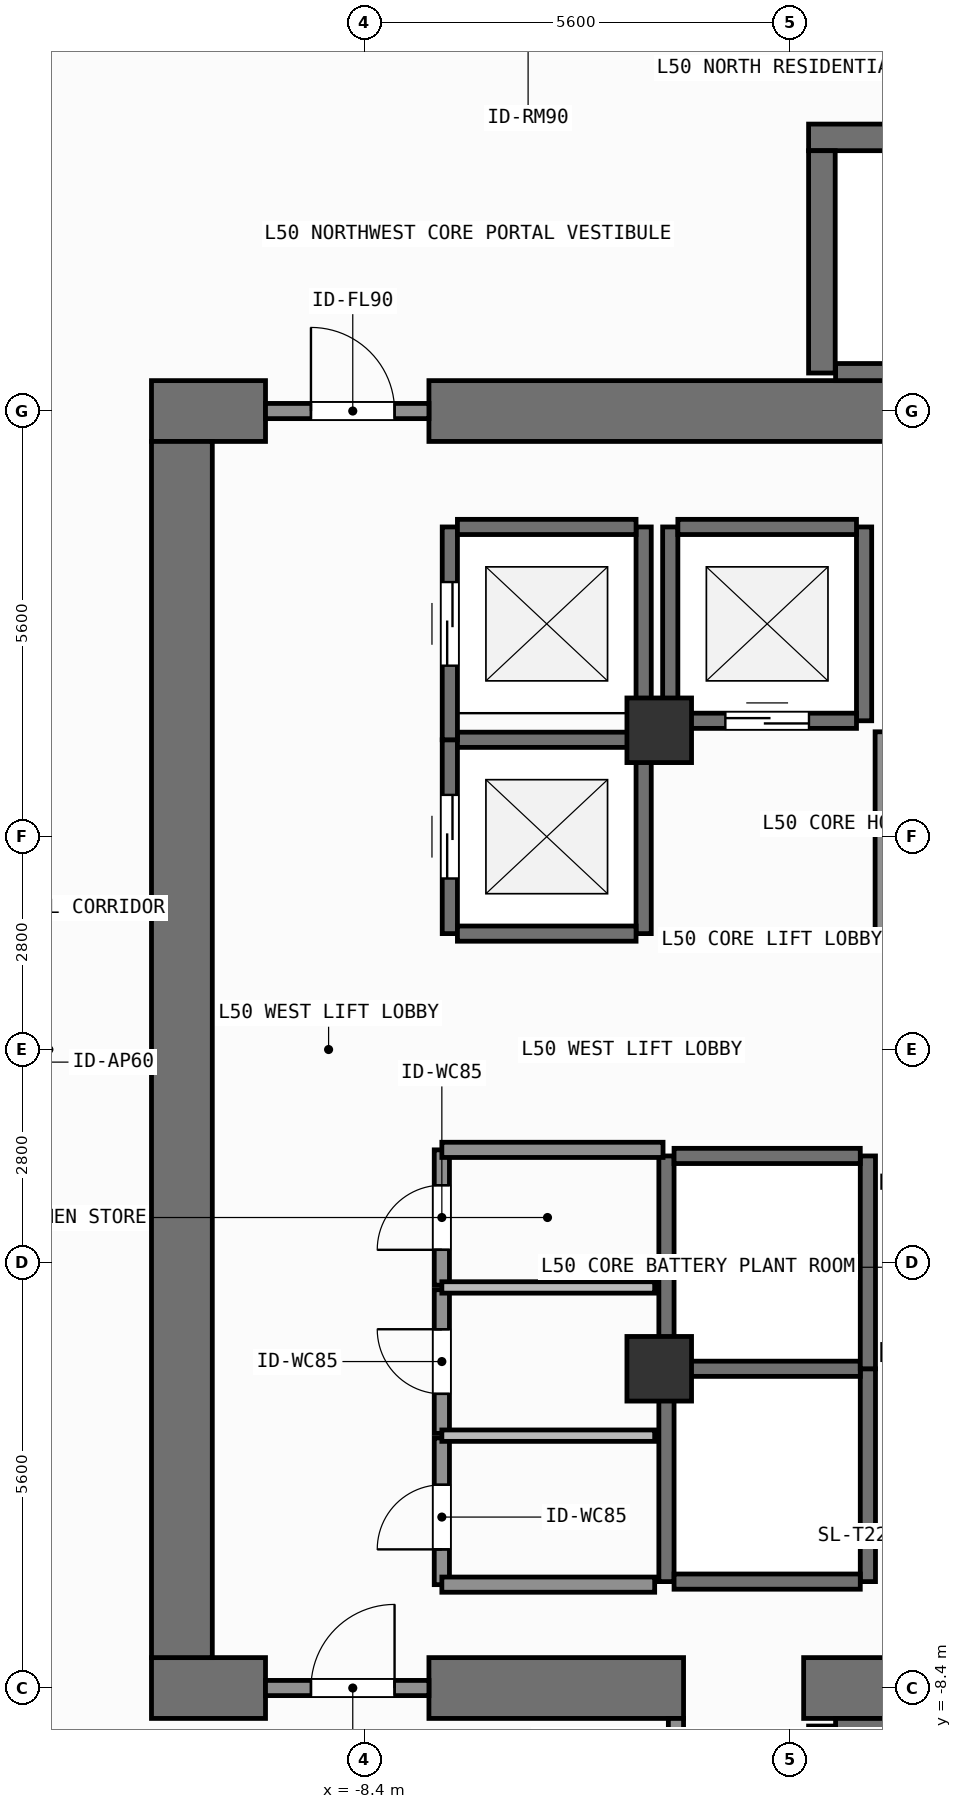
"""IFC4 building model, lengths in metres.
Left out: names, types, materials, properties, quantities, classifications, styles, units other than length and angle.
Written with IfcOpenShell. Run it as: python <this file> out.ifc"""

import sys

from ifc_helpers import new_model, si_unit, direction, frame, frame_2d, origin, origin_2d, place, context, subcontext, project, spatial, rectangle, extrude, element, fill, save


model = new_model("IFC4")
c1 = context("Model", 3, precision=1e-05, world=origin(), true_north=direction((0.0, 1.0)))
c2 = subcontext(c1, "Body", "Model", "MODEL_VIEW")
j1 = project(units=[si_unit("LENGTHUNIT", "METRE"), si_unit("PLANEANGLEUNIT", "RADIAN")], contexts=[c1])
p1 = place(None, origin())
s1 = spatial("IfcSite", under=j1, at=p1, CompositionType="ELEMENT")
p2 = place(p1, origin())
s2 = spatial("IfcBuilding", under=s1, at=p2, CompositionType="ELEMENT")
p3 = place(p2, frame((0.0, 0.0, 203.1)))
s3 = spatial("IfcBuildingStorey", under=s2, at=p3, CompositionType="ELEMENT", Elevation=203.1)
p4 = place(p3, frame((-11.2, -8.4, 0.0), z_axis=(0.0, 0.0, 1.0), x_axis=(1.0, 0.0, 0.0)))
e1 = element("IfcWall", 1, at=p4, inside=s3, PredefinedType="SHEAR", context=c2, shape_type="SweptSolid", body=[
    extrude(rectangle(XDim=1.5, YDim=0.8, at=frame_2d((0.75, 0.0))), origin(), (0.0, 0.0, 1.0), 3.9),
])
p5 = place(p3, frame((-7.55, -8.4, 0.0), z_axis=(0.0, 0.0, 1.0), x_axis=(1.0, 0.0, 0.0)))
e2 = element("IfcWall", 2, at=p5, inside=s3, PredefinedType="SHEAR", context=c2, shape_type="SweptSolid", body=[
    extrude(rectangle(XDim=3.35, YDim=0.8, at=frame_2d((1.675, 0.0))), origin(), (0.0, 0.0, 1.0), 3.9),
])
p6 = place(p3, frame((-2.62, -8.4, 0.0), z_axis=(0.0, 0.0, 1.0), x_axis=(1.0, 0.0, 0.0)))
e3 = element("IfcWall", 3, at=p6, inside=s3, PredefinedType="SHEAR", context=c2, shape_type="SweptSolid", body=[
    extrude(rectangle(XDim=7.27, YDim=0.8, at=frame_2d((3.635, 0.0))), origin(), (0.0, 0.0, 1.0), 3.9),
])
p7 = place(p3, frame((-11.2, 8.4, 0.0), z_axis=(0.0, 0.0, 1.0), x_axis=(1.0, 0.0, 0.0)))
e4 = element("IfcWall", 4, at=p7, inside=s3, PredefinedType="SHEAR", context=c2, shape_type="SweptSolid", body=[
    extrude(rectangle(XDim=1.5, YDim=0.8, at=frame_2d((0.75, 0.0))), origin(), (0.0, 0.0, 1.0), 3.9),
])
p8 = place(p3, frame((-7.55, 8.4, 0.0), z_axis=(0.0, 0.0, 1.0), x_axis=(1.0, 0.0, 0.0)))
e5 = element("IfcWall", 5, at=p8, inside=s3, PredefinedType="SHEAR", context=c2, shape_type="SweptSolid", body=[
    extrude(rectangle(XDim=16.35, YDim=0.8, at=frame_2d((8.175, 0.0))), origin(), (0.0, 0.0, 1.0), 3.9),
])
p9 = place(p3, frame((-10.8, -8.0, 0.0), z_axis=(0.0, 0.0, 1.0), x_axis=(0.0, 1.0, 0.0)))
e6 = element("IfcWall", 6, at=p9, inside=s3, PredefinedType="SHEAR", context=c2, shape_type="SweptSolid", body=[
    extrude(rectangle(XDim=16.0, YDim=0.8, at=frame_2d((8.0, 0.0))), origin(), (0.0, 0.0, 1.0), 3.9),
])
p10 = place(p3, frame((-2.2, -8.913, 0.0), z_axis=(0.0, 0.0, 1.0), x_axis=(1.0, 0.0, 0.0)))
e7 = element("IfcWall", 7, at=p10, inside=s3, PredefinedType="SHEAR", context=c2, shape_type="SweptSolid", body=[
    extrude(rectangle(XDim=6.6, YDim=0.225, at=frame_2d((3.3, 0.0))), origin(), (0.0, 0.0, 1.0), 3.9),
])
p11 = place(p3, frame((-2.38, -11.825, 0.0), z_axis=(0.0, 0.0, 1.0), x_axis=(0.0, 1.0, 0.0)))
e8 = element("IfcWall", 8, at=p11, inside=s3, PredefinedType="SHEAR", context=c2, shape_type="SweptSolid", body=[
    extrude(rectangle(XDim=2.925, YDim=0.35, at=frame_2d((1.462, 0.0))), origin(), (0.0, 0.0, 1.0), 3.9),
])
p12 = place(p3, frame((-2.555, 12.0, 0.0), z_axis=(0.0, 0.0, 1.0), x_axis=(1.0, 0.0, 0.0)))
e9 = element("IfcWall", 9, at=p12, inside=s3, PredefinedType="SHEAR", context=c2, shape_type="SweptSolid", body=[
    extrude(rectangle(XDim=7.31, YDim=0.35, at=frame_2d((3.655, 0.0))), origin(), (0.0, 0.0, 1.0), 3.9),
])
p13 = place(p3, frame((-2.2, 8.913, 0.0), z_axis=(0.0, 0.0, 1.0), x_axis=(1.0, 0.0, 0.0)))
e10 = element("IfcWall", 10, at=p13, inside=s3, PredefinedType="SHEAR", context=c2, shape_type="SweptSolid", body=[
    extrude(rectangle(XDim=6.6, YDim=0.225, at=frame_2d((3.3, 0.0))), origin(), (0.0, 0.0, 1.0), 3.9),
])
p14 = place(p3, frame((-2.38, 8.9, 0.0), z_axis=(0.0, 0.0, 1.0), x_axis=(0.0, 1.0, 0.0)))
e11 = element("IfcWall", 11, at=p14, inside=s3, PredefinedType="SHEAR", context=c2, shape_type="SweptSolid", body=[
    extrude(rectangle(XDim=2.925, YDim=0.35, at=frame_2d((1.462, 0.0))), origin(), (0.0, 0.0, 1.0), 3.9),
])
for number, where, z_axis, x_axis in (
    (12, (-4.52, -4.2, 0.0), (0.0, 0.0, 1.0), (1.0, 0.0, 0.0)),
    (13, (-4.52, 4.2, 0.0), (0.0, 0.0, 1.0), (1.0, 0.0, 0.0)),
):
    element("IfcColumn", number, at=place(p3, frame(where, z_axis=z_axis, x_axis=x_axis)), inside=s3, PredefinedType="COLUMN", context=c2, shape_type="SweptSolid", body=[
        extrude(rectangle(XDim=0.85, YDim=0.85, at=origin_2d()), origin(), (0.0, 0.0, 1.0), 3.9),
    ])
p15 = place(p3, frame((-7.275, 1.525, 0.0), z_axis=(0.0, 0.0, 1.0), x_axis=(0.0, 1.0, 0.0)))
e14 = element("IfcWall", 14, at=p15, inside=s3, PredefinedType="SHEAR", context=c2, shape_type="SweptSolid", body=[
    extrude(rectangle(XDim=2.55, YDim=0.2, at=frame_2d((1.275, 0.0))), origin(), (0.0, 0.0, 1.0), 3.68),
])
p16 = place(p15, frame((0.725, 0.0, 0.0)))
e15 = element("IfcOpeningElement", 15, at=p16, cuts=e14, PredefinedType="OPENING", context=c2, shape_type="SweptSolid", body=[
    extrude(rectangle(XDim=1.1, YDim=2.2, at=frame_2d((0.55, 1.1))), frame((0.0, 0.11, 0.0), z_axis=(0.0, -1.0, 0.0), x_axis=(1.0, 0.0, 0.0)), (0.0, 0.0, 1.0), 0.22),
])
p17 = place(p3, frame((-4.725, 1.525, 0.0), z_axis=(0.0, 0.0, 1.0), x_axis=(0.0, 1.0, 0.0)))
e16 = element("IfcWall", 16, at=p17, inside=s3, PredefinedType="SHEAR", context=c2, shape_type="SweptSolid", body=[
    extrude(rectangle(XDim=2.55, YDim=0.2, at=frame_2d((1.275, 0.0))), origin(), (0.0, 0.0, 1.0), 3.68),
])
for number, where, z_axis, x_axis in (
    (17, (-7.175, 1.525, 0.0), (0.0, 0.0, 1.0), (1.0, 0.0, 0.0)),
    (18, (-7.175, 4.075, 0.0), (0.0, 0.0, 1.0), (1.0, 0.0, 0.0)),
):
    element("IfcWall", number, at=place(p3, frame(where, z_axis=z_axis, x_axis=x_axis)), inside=s3, PredefinedType="SHEAR", context=c2, shape_type="SweptSolid", body=[
        extrude(rectangle(XDim=2.35, YDim=0.2, at=frame_2d((1.175, 0.0))), origin(), (0.0, 0.0, 1.0), 3.68),
    ])
p18 = place(p3, frame((-7.275, 4.075, 0.0), z_axis=(0.0, 0.0, 1.0), x_axis=(0.0, 1.0, 0.0)))
e19 = element("IfcWall", 19, at=p18, inside=s3, PredefinedType="SHEAR", context=c2, shape_type="SweptSolid", body=[
    extrude(rectangle(XDim=2.8, YDim=0.2, at=frame_2d((1.4, 0.0))), origin(), (0.0, 0.0, 1.0), 3.68),
])
p19 = place(p18, frame((0.975, 0.0, 0.0)))
e20 = element("IfcOpeningElement", 20, at=p19, cuts=e19, PredefinedType="OPENING", context=c2, shape_type="SweptSolid", body=[
    extrude(rectangle(XDim=1.1, YDim=2.2, at=frame_2d((0.55, 1.1))), frame((0.0, 0.11, 0.0), z_axis=(0.0, -1.0, 0.0), x_axis=(1.0, 0.0, 0.0)), (0.0, 0.0, 1.0), 0.22),
])
p20 = place(p3, frame((-4.725, 4.075, 0.0), z_axis=(0.0, 0.0, 1.0), x_axis=(0.0, 1.0, 0.0)))
e21 = element("IfcWall", 21, at=p20, inside=s3, PredefinedType="SHEAR", context=c2, shape_type="SweptSolid", body=[
    extrude(rectangle(XDim=2.8, YDim=0.2, at=frame_2d((1.4, 0.0))), origin(), (0.0, 0.0, 1.0), 3.68),
])
p21 = place(p3, frame((-7.175, 6.875, 0.0), z_axis=(0.0, 0.0, 1.0), x_axis=(1.0, 0.0, 0.0)))
e22 = element("IfcWall", 22, at=p21, inside=s3, PredefinedType="SHEAR", context=c2, shape_type="SweptSolid", body=[
    extrude(rectangle(XDim=2.35, YDim=0.2, at=frame_2d((1.175, 0.0))), origin(), (0.0, 0.0, 1.0), 3.68),
])
for number, where, z_axis, x_axis in (
    (23, (-4.375, 4.325, 0.0), (0.0, 0.0, 1.0), (0.0, 1.0, 0.0)),
    (24, (-1.825, 4.325, 0.0), (0.0, 0.0, 1.0), (0.0, 1.0, 0.0)),
):
    element("IfcWall", number, at=place(p3, frame(where, z_axis=z_axis, x_axis=x_axis)), inside=s3, PredefinedType="SHEAR", context=c2, shape_type="SweptSolid", body=[
        extrude(rectangle(XDim=2.55, YDim=0.2, at=frame_2d((1.275, 0.0))), origin(), (0.0, 0.0, 1.0), 3.68),
    ])
p22 = place(p3, frame((-4.275, 4.325, 0.0), z_axis=(0.0, 0.0, 1.0), x_axis=(1.0, 0.0, 0.0)))
e25 = element("IfcWall", 25, at=p22, inside=s3, PredefinedType="SHEAR", context=c2, shape_type="SweptSolid", body=[
    extrude(rectangle(XDim=2.35, YDim=0.2, at=frame_2d((1.175, 0.0))), origin(), (0.0, 0.0, 1.0), 3.68),
])
p23 = place(p22, frame((0.625, 0.0, 0.0)))
e26 = element("IfcOpeningElement", 26, at=p23, cuts=e25, PredefinedType="OPENING", context=c2, shape_type="SweptSolid", body=[
    extrude(rectangle(XDim=1.1, YDim=2.2, at=frame_2d((0.55, 1.1))), frame((0.0, 0.11, 0.0), z_axis=(0.0, -1.0, 0.0), x_axis=(1.0, 0.0, 0.0)), (0.0, 0.0, 1.0), 0.22),
])
p24 = place(p3, frame((-4.275, 6.875, 0.0), z_axis=(0.0, 0.0, 1.0), x_axis=(1.0, 0.0, 0.0)))
e27 = element("IfcWall", 27, at=p24, inside=s3, PredefinedType="SHEAR", context=c2, shape_type="SweptSolid", body=[
    extrude(rectangle(XDim=2.35, YDim=0.2, at=frame_2d((1.175, 0.0))), origin(), (0.0, 0.0, 1.0), 3.68),
])
for number, where, z_axis, x_axis in (
    (28, (-4.425, -7.0, 0.0), (0.0, 0.0, 1.0), (0.0, 1.0, 0.0)),
    (29, (-1.775, -7.0, 0.0), (0.0, 0.0, 1.0), (0.0, 1.0, 0.0)),
):
    element("IfcWall", number, at=place(p3, frame(where, z_axis=z_axis, x_axis=x_axis)), inside=s3, PredefinedType="SHEAR", context=c2, shape_type="SweptSolid", body=[
        extrude(rectangle(XDim=2.8, YDim=0.2, at=frame_2d((1.4, 0.0))), origin(), (0.0, 0.0, 1.0), 3.68),
    ])
for number, where, z_axis, x_axis in (
    (30, (-4.325, -7.0, 0.0), (0.0, 0.0, 1.0), (1.0, 0.0, 0.0)),
    (31, (-4.325, -4.2, 0.0), (0.0, 0.0, 1.0), (1.0, 0.0, 0.0)),
):
    element("IfcWall", number, at=place(p3, frame(where, z_axis=z_axis, x_axis=x_axis)), inside=s3, PredefinedType="SHEAR", context=c2, shape_type="SweptSolid", body=[
        extrude(rectangle(XDim=2.45, YDim=0.2, at=frame_2d((1.225, 0.0))), origin(), (0.0, 0.0, 1.0), 3.68),
    ])
for number, where, z_axis, x_axis in (
    (32, (-4.425, -4.2, 0.0), (0.0, 0.0, 1.0), (0.0, 1.0, 0.0)),
    (33, (-1.775, -4.2, 0.0), (0.0, 0.0, 1.0), (0.0, 1.0, 0.0)),
):
    element("IfcWall", number, at=place(p3, frame(where, z_axis=z_axis, x_axis=x_axis)), inside=s3, PredefinedType="SHEAR", context=c2, shape_type="SweptSolid", body=[
        extrude(rectangle(XDim=2.8, YDim=0.2, at=frame_2d((1.4, 0.0))), origin(), (0.0, 0.0, 1.0), 3.68),
    ])
p25 = place(p3, frame((-4.325, -1.4, 0.0), z_axis=(0.0, 0.0, 1.0), x_axis=(1.0, 0.0, 0.0)))
e34 = element("IfcWall", 34, at=p25, inside=s3, PredefinedType="SHEAR", context=c2, shape_type="SweptSolid", body=[
    extrude(rectangle(XDim=2.45, YDim=0.2, at=frame_2d((1.225, 0.0))), origin(), (0.0, 0.0, 1.0), 3.68),
])
p26 = place(p3, frame((-9.7, -8.4, 0.0), z_axis=(0.0, 0.0, 1.0), x_axis=(1.0, 0.0, 0.0)))
e35 = element("IfcWall", 35, at=p26, inside=s3, PredefinedType="SOLIDWALL", context=c2, shape_type="SweptSolid", body=[
    extrude(rectangle(XDim=2.15, YDim=0.2, at=frame_2d((1.075, 0.0))), origin(), (0.0, 0.0, 1.0), 2.82),
])
p27 = place(p26, frame((0.598, 0.0, 0.0)))
e36 = element("IfcOpeningElement", 36, at=p27, cuts=e35, PredefinedType="OPENING", context=c2, shape_type="SweptSolid", body=[
    extrude(rectangle(XDim=1.1, YDim=2.15, at=frame_2d((0.55, 1.075))), frame((0.0, 0.11, 0.0), z_axis=(0.0, -1.0, 0.0), x_axis=(1.0, 0.0, 0.0)), (0.0, 0.0, 1.0), 0.22),
])
p28 = place(p3, frame((-9.7, 8.4, 0.0), z_axis=(0.0, 0.0, 1.0), x_axis=(1.0, 0.0, 0.0)))
e37 = element("IfcWall", 37, at=p28, inside=s3, PredefinedType="SOLIDWALL", context=c2, shape_type="SweptSolid", body=[
    extrude(rectangle(XDim=2.15, YDim=0.2, at=frame_2d((1.075, 0.0))), origin(), (0.0, 0.0, 1.0), 2.82),
])
p29 = place(p28, frame((0.598, 0.0, 0.0)))
e38 = element("IfcOpeningElement", 38, at=p29, cuts=e37, PredefinedType="OPENING", context=c2, shape_type="SweptSolid", body=[
    extrude(rectangle(XDim=1.1, YDim=2.15, at=frame_2d((0.55, 1.075))), frame((0.0, 0.11, 0.0), z_axis=(0.0, -1.0, 0.0), x_axis=(1.0, 0.0, 0.0)), (0.0, 0.0, 1.0), 0.22),
])
p30 = place(p3, frame((-7.38, -7.04, 0.0), z_axis=(0.0, 0.0, 1.0), x_axis=(0.0, 1.0, 0.0)))
e39 = element("IfcWall", 39, at=p30, inside=s3, PredefinedType="SOLIDWALL", context=c2, shape_type="SweptSolid", body=[
    extrude(rectangle(XDim=1.93, YDim=0.2, at=frame_2d((0.965, 0.0))), origin(), (0.0, 0.0, 1.0), 3.68),
])
p31 = place(p30, frame((0.464, 0.0, 0.0)))
e40 = element("IfcOpeningElement", 40, at=p31, cuts=e39, PredefinedType="OPENING", context=c2, shape_type="SweptSolid", body=[
    extrude(rectangle(XDim=0.85, YDim=2.1, at=frame_2d((0.425, 1.05))), frame((0.0, 0.11, 0.0), z_axis=(0.0, -1.0, 0.0), x_axis=(1.0, 0.0, 0.0)), (0.0, 0.0, 1.0), 0.22),
])
p32 = place(p3, frame((-7.38, -5.05, 0.0), z_axis=(0.0, 0.0, 1.0), x_axis=(0.0, 1.0, 0.0)))
e41 = element("IfcWall", 41, at=p32, inside=s3, PredefinedType="SOLIDWALL", context=c2, shape_type="SweptSolid", body=[
    extrude(rectangle(XDim=1.89, YDim=0.2, at=frame_2d((0.945, 0.0))), origin(), (0.0, 0.0, 1.0), 3.68),
])
p33 = place(p32, frame((0.52, 0.0, 0.0)))
e42 = element("IfcOpeningElement", 42, at=p33, cuts=e41, PredefinedType="OPENING", context=c2, shape_type="SweptSolid", body=[
    extrude(rectangle(XDim=0.85, YDim=2.1, at=frame_2d((0.425, 1.05))), frame((0.0, 0.11, 0.0), z_axis=(0.0, -1.0, 0.0), x_axis=(1.0, 0.0, 0.0)), (0.0, 0.0, 1.0), 0.22),
])
p34 = place(p3, frame((-7.38, -3.1, 0.0), z_axis=(0.0, 0.0, 1.0), x_axis=(0.0, 1.0, 0.0)))
e43 = element("IfcWall", 43, at=p34, inside=s3, PredefinedType="SOLIDWALL", context=c2, shape_type="SweptSolid", body=[
    extrude(rectangle(XDim=1.78, YDim=0.2, at=frame_2d((0.89, 0.0))), origin(), (0.0, 0.0, 1.0), 3.68),
])
p35 = place(p34, frame((0.465, 0.0, 0.0)))
e44 = element("IfcOpeningElement", 44, at=p35, cuts=e43, PredefinedType="OPENING", context=c2, shape_type="SweptSolid", body=[
    extrude(rectangle(XDim=0.85, YDim=2.1, at=frame_2d((0.425, 1.05))), frame((0.0, 0.11, 0.0), z_axis=(0.0, -1.0, 0.0), x_axis=(1.0, 0.0, 0.0)), (0.0, 0.0, 1.0), 0.22),
])
p36 = place(p3, frame((-4.3, -12.06, 0.0), z_axis=(0.0, 0.0, 1.0), x_axis=(0.0, 1.0, 0.0)))
e45 = element("IfcWall", 45, at=p36, inside=s3, PredefinedType="SOLIDWALL", context=c2, shape_type="SweptSolid", body=[
    extrude(rectangle(XDim=3.26, YDim=0.2, at=frame_2d((1.63, 0.0))), origin(), (0.0, 0.0, 1.0), 3.68),
])
p37 = place(p3, frame((-7.38, -1.32, 0.0), z_axis=(0.0, 0.0, 1.0), x_axis=(1.0, 0.0, 0.0)))
e46 = element("IfcWall", 46, at=p37, inside=s3, PredefinedType="SOLIDWALL", context=c2, shape_type="SweptSolid", body=[
    extrude(rectangle(XDim=2.91, YDim=0.2, at=frame_2d((1.455, 0.0))), origin(), (0.0, 0.0, 1.0), 3.68),
])
p38 = place(p3, frame((-1.58, 1.48, 0.0), z_axis=(0.0, 0.0, 1.0), x_axis=(0.0, 1.0, 0.0)))
e47 = element("IfcWall", 47, at=p38, inside=s3, PredefinedType="SOLIDWALL", context=c2, shape_type="SweptSolid", body=[
    extrude(rectangle(XDim=2.7, YDim=0.2, at=frame_2d((1.35, 0.0))), origin(), (0.0, 0.0, 1.0), 3.68),
])
p39 = place(p3, frame((-7.38, -7.04, 0.0), z_axis=(0.0, 0.0, 1.0), x_axis=(1.0, 0.0, 0.0)))
e48 = element("IfcWall", 48, at=p39, inside=s3, PredefinedType="SOLIDWALL", context=c2, shape_type="SweptSolid", body=[
    extrude(rectangle(XDim=2.8, YDim=0.2, at=frame_2d((1.4, 0.0))), origin(), (0.0, 0.0, 1.0), 3.68),
])
for number, where, z_axis, x_axis in (
    (49, (-7.38, -5.08, 0.0), (0.0, 0.0, 1.0), (1.0, 0.0, 0.0)),
    (50, (-7.38, -3.13, 0.0), (0.0, 0.0, 1.0), (1.0, 0.0, 0.0)),
):
    element("IfcWall", number, at=place(p3, frame(where, z_axis=z_axis, x_axis=x_axis)), inside=s3, PredefinedType="PARTITIONING", context=c2, shape_type="SweptSolid", body=[
        extrude(rectangle(XDim=2.8, YDim=0.15, at=frame_2d((1.4, 0.0))), origin(), (0.0, 0.0, 1.0), 3.68),
    ])
p40 = place(p16, origin())
e51 = element("IfcDoor", 51, at=p40, inside=s3, OperationType="SLIDING_TO_LEFT", PredefinedType="DOOR", context=c2, shape_type="SweptSolid", body=[
    extrude(rectangle(XDim=1.1, YDim=2.2, at=frame_2d((0.55, 1.1))), frame((0.0, 0.025, 0.0), z_axis=(0.0, -1.0, 0.0), x_axis=(1.0, 0.0, 0.0)), (0.0, 0.0, 1.0), 0.05),
])
fill(e15, e51)
p41 = place(p19, origin())
e52 = element("IfcDoor", 52, at=p41, inside=s3, OperationType="SLIDING_TO_LEFT", PredefinedType="DOOR", context=c2, shape_type="SweptSolid", body=[
    extrude(rectangle(XDim=1.1, YDim=2.2, at=frame_2d((0.55, 1.1))), frame((0.0, 0.025, 0.0), z_axis=(0.0, -1.0, 0.0), x_axis=(1.0, 0.0, 0.0)), (0.0, 0.0, 1.0), 0.05),
])
fill(e20, e52)
p42 = place(p23, origin())
e53 = element("IfcDoor", 53, at=p42, inside=s3, OperationType="SLIDING_TO_LEFT", PredefinedType="DOOR", context=c2, shape_type="SweptSolid", body=[
    extrude(rectangle(XDim=1.1, YDim=2.2, at=frame_2d((0.55, 1.1))), frame((0.0, 0.025, 0.0), z_axis=(0.0, -1.0, 0.0), x_axis=(1.0, 0.0, 0.0)), (0.0, 0.0, 1.0), 0.05),
])
fill(e26, e53)
p43 = place(p27, origin())
e54 = element("IfcDoor", 54, at=p43, inside=s3, OperationType="SINGLE_SWING_RIGHT", PredefinedType="DOOR", context=c2, shape_type="SweptSolid", body=[
    extrude(rectangle(XDim=1.1, YDim=2.15, at=frame_2d((0.55, 1.075))), frame((0.0, 0.025, 0.0), z_axis=(0.0, -1.0, 0.0), x_axis=(1.0, 0.0, 0.0)), (0.0, 0.0, 1.0), 0.05),
])
fill(e36, e54)
p44 = place(p29, origin())
e55 = element("IfcDoor", 55, at=p44, inside=s3, OperationType="SINGLE_SWING_LEFT", PredefinedType="DOOR", context=c2, shape_type="SweptSolid", body=[
    extrude(rectangle(XDim=1.1, YDim=2.15, at=frame_2d((0.55, 1.075))), frame((0.0, 0.025, 0.0), z_axis=(0.0, -1.0, 0.0), x_axis=(1.0, 0.0, 0.0)), (0.0, 0.0, 1.0), 0.05),
])
fill(e38, e55)
p45 = place(p31, origin())
e56 = element("IfcDoor", 56, at=p45, inside=s3, OperationType="SINGLE_SWING_LEFT", PredefinedType="DOOR", context=c2, shape_type="SweptSolid", body=[
    extrude(rectangle(XDim=0.85, YDim=2.1, at=frame_2d((0.425, 1.05))), frame((0.0, 0.025, 0.0), z_axis=(0.0, -1.0, 0.0), x_axis=(1.0, 0.0, 0.0)), (0.0, 0.0, 1.0), 0.05),
])
fill(e40, e56)
p46 = place(p33, origin())
e57 = element("IfcDoor", 57, at=p46, inside=s3, OperationType="SINGLE_SWING_RIGHT", PredefinedType="DOOR", context=c2, shape_type="SweptSolid", body=[
    extrude(rectangle(XDim=0.85, YDim=2.1, at=frame_2d((0.425, 1.05))), frame((0.0, 0.025, 0.0), z_axis=(0.0, -1.0, 0.0), x_axis=(1.0, 0.0, 0.0)), (0.0, 0.0, 1.0), 0.05),
])
fill(e42, e57)
p47 = place(p35, origin())
e58 = element("IfcDoor", 58, at=p47, inside=s3, OperationType="SINGLE_SWING_LEFT", PredefinedType="DOOR", context=c2, shape_type="SweptSolid", body=[
    extrude(rectangle(XDim=0.85, YDim=2.1, at=frame_2d((0.425, 1.05))), frame((0.0, 0.025, 0.0), z_axis=(0.0, -1.0, 0.0), x_axis=(1.0, 0.0, 0.0)), (0.0, 0.0, 1.0), 0.05),
])
fill(e44, e58)
save(model, sys.argv[1])
